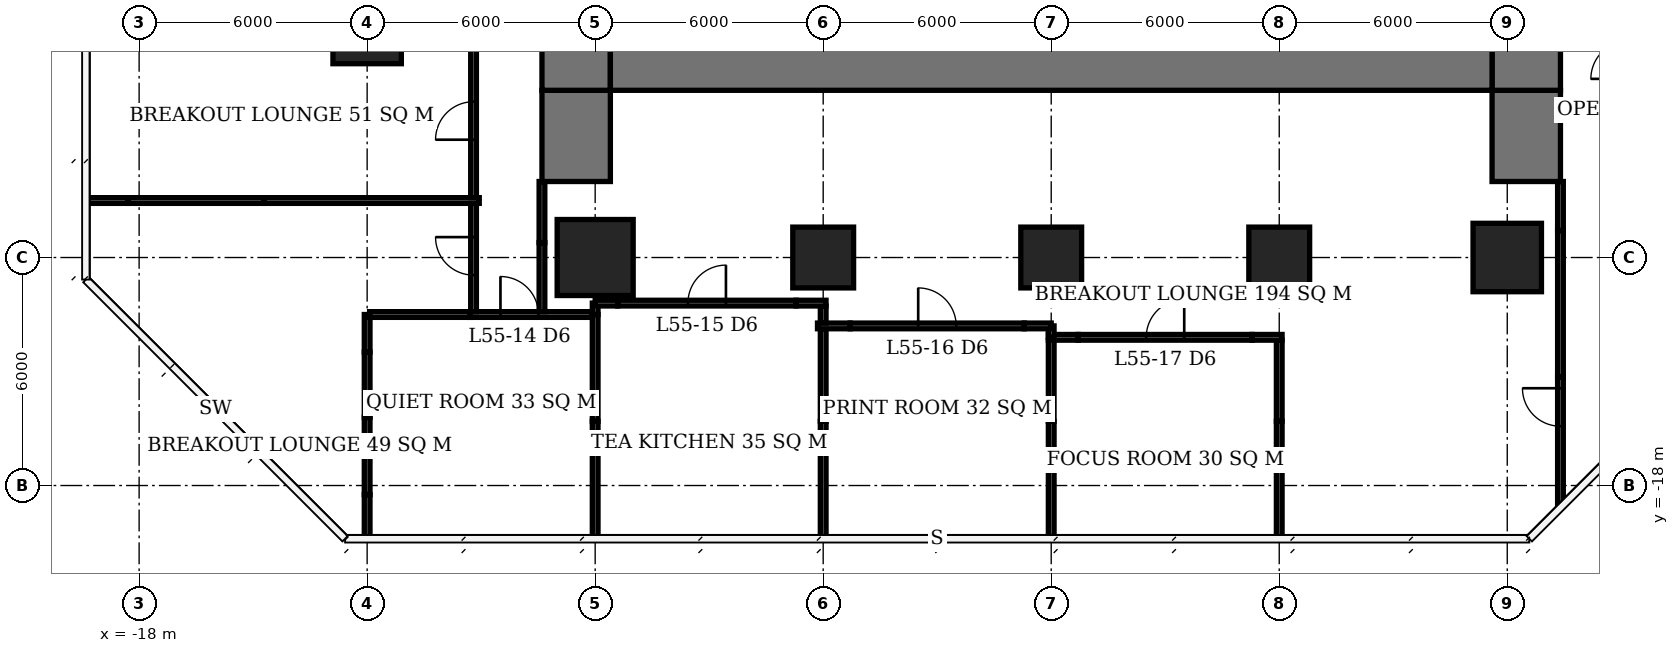
"""IFC4 building model, lengths in metres.
Left out: names, types, materials, properties, quantities, classifications, styles, units other than length and angle.
Written with IfcOpenShell. Run it as: python <this file> out.ifc"""

import sys

from ifc_helpers import new_model, si_unit, direction, frame, frame_2d, origin, origin_2d, place, context, subcontext, project, spatial, rectangle, extrude, element, fill, save


model = new_model("IFC4")
c1 = context("Model", 3, precision=1e-05, world=origin(), true_north=direction((0.0, 1.0)))
c2 = subcontext(c1, "Body", "Model", "MODEL_VIEW")
j1 = project(units=[si_unit("LENGTHUNIT", "METRE"), si_unit("PLANEANGLEUNIT", "RADIAN")], contexts=[c1])
p1 = place(None, origin())
s1 = spatial("IfcSite", under=j1, at=p1, CompositionType="ELEMENT")
p2 = place(p1, origin())
s2 = spatial("IfcBuilding", under=s1, at=p2, CompositionType="ELEMENT")
p3 = place(p2, frame((0.0, 0.0, 224.0)))
s3 = spatial("IfcBuildingStorey", under=s2, at=p3, CompositionType="ELEMENT", Elevation=224.0)
p4 = place(p3, frame((-12.0, -6.0, 0.0), z_axis=(0.0, 0.0, 1.0), x_axis=(1.0, 0.0, 0.0)))
e1 = element("IfcColumn", 1, at=p4, inside=s3, PredefinedType="COLUMN", context=c2, shape_type="SweptSolid", body=[
    extrude(rectangle(XDim=1.8, YDim=1.8, at=origin_2d()), origin(), (0.0, 0.0, 1.0), 3.9),
])
p5 = place(p3, frame((-6.0, -12.0, 0.0), z_axis=(0.0, 0.0, 1.0), x_axis=(1.0, 0.0, 0.0)))
e2 = element("IfcColumn", 2, at=p5, inside=s3, PredefinedType="COLUMN", context=c2, shape_type="SweptSolid", body=[
    extrude(rectangle(XDim=2.0, YDim=2.0, at=origin_2d()), origin(), (0.0, 0.0, 1.0), 3.9),
])
for number, where, z_axis, x_axis in (
    (3, (0.0, -12.0, 0.0), (0.0, 0.0, 1.0), (1.0, 0.0, 0.0)),
    (4, (6.0, -12.0, 0.0), (0.0, 0.0, 1.0), (1.0, 0.0, 0.0)),
    (5, (12.0, -12.0, 0.0), (0.0, 0.0, 1.0), (1.0, 0.0, 0.0)),
):
    element("IfcColumn", number, at=place(p3, frame(where, z_axis=z_axis, x_axis=x_axis)), inside=s3, PredefinedType="COLUMN", context=c2, shape_type="SweptSolid", body=[
        extrude(rectangle(XDim=1.6, YDim=1.6, at=origin_2d()), origin(), (0.0, 0.0, 1.0), 3.9),
    ])
p6 = place(p3, frame((18.0, -12.0, 0.0), z_axis=(0.0, 0.0, 1.0), x_axis=(1.0, 0.0, 0.0)))
e6 = element("IfcColumn", 6, at=p6, inside=s3, PredefinedType="COLUMN", context=c2, shape_type="SweptSolid", body=[
    extrude(rectangle(XDim=1.8, YDim=1.8, at=origin_2d()), origin(), (0.0, 0.0, 1.0), 3.9),
])
p7 = place(p3, frame((-5.6, -6.6, 0.0), z_axis=(0.0, 0.0, 1.0), x_axis=(1.0, 0.0, 0.0)))
e7 = element("IfcWall", 7, at=p7, inside=s3, PredefinedType="SHEAR", context=c2, shape_type="SweptSolid", body=[
    extrude(rectangle(XDim=23.2, YDim=2.0, at=frame_2d((11.6, 0.0))), origin(), (0.0, 0.0, 1.0), 3.9),
])
p8 = place(p3, frame((-6.5, -7.6, 0.0), z_axis=(0.0, 0.0, 1.0), x_axis=(0.0, 1.0, 0.0)))
e8 = element("IfcWall", 8, at=p8, inside=s3, PredefinedType="SHEAR", context=c2, shape_type="SweptSolid", body=[
    extrude(rectangle(XDim=21.2, YDim=1.8, at=frame_2d((10.6, 0.0))), origin(), (0.0, 0.0, 1.0), 3.9),
])
p9 = place(p8, frame((7.8, 0.0, 0.0)))
e9 = element("IfcOpeningElement", 9, at=p9, cuts=e8, PredefinedType="OPENING", context=c2, shape_type="SweptSolid", body=[
    extrude(rectangle(XDim=1.8, YDim=2.4, at=frame_2d((0.9, 1.2))), frame((0.0, 0.91, 0.0), z_axis=(0.0, -1.0, 0.0), x_axis=(1.0, 0.0, 0.0)), (0.0, 0.0, 1.0), 1.82),
])
p10 = place(p3, frame((18.5, -7.6, 0.0), z_axis=(0.0, 0.0, 1.0), x_axis=(0.0, 1.0, 0.0)))
e10 = element("IfcWall", 10, at=p10, inside=s3, PredefinedType="SHEAR", context=c2, shape_type="SweptSolid", body=[
    extrude(rectangle(XDim=21.2, YDim=1.8, at=frame_2d((10.6, 0.0))), origin(), (0.0, 0.0, 1.0), 3.9),
])
p11 = place(p10, frame((9.2, 0.0, 0.0)))
e11 = element("IfcOpeningElement", 11, at=p11, cuts=e10, PredefinedType="OPENING", context=c2, shape_type="SweptSolid", body=[
    extrude(rectangle(XDim=1.8, YDim=2.4, at=frame_2d((0.9, 1.2))), frame((0.0, 0.91, 0.0), z_axis=(0.0, -1.0, 0.0), x_axis=(1.0, 0.0, 0.0)), (0.0, 0.0, 1.0), 1.82),
])
for number, where, z_axis, x_axis in (
    (12, (-6.5, -10.0, 0.0), (0.0, 0.0, 1.0), (0.0, 1.0, 0.0)),
    (13, (18.5, -10.0, 0.0), (0.0, 0.0, 1.0), (0.0, 1.0, 0.0)),
):
    element("IfcWall", number, at=place(p3, frame(where, z_axis=z_axis, x_axis=x_axis)), inside=s3, PredefinedType="SHEAR", context=c2, shape_type="SweptSolid", body=[
        extrude(rectangle(XDim=2.4, YDim=1.8, at=frame_2d((1.2, 0.0))), origin(), (0.0, 0.0, 1.0), 3.9),
    ])
p12 = place(p3, frame((5.925, -14.1, 0.0), z_axis=(0.0, 0.0, 1.0), x_axis=(1.0, 0.0, 0.0)))
e14 = element("IfcWall", 14, at=p12, inside=s3, PredefinedType="PARTITIONING", context=c2, shape_type="SweptSolid", body=[
    extrude(rectangle(XDim=0.785, YDim=0.15, at=frame_2d((0.393, 0.0))), origin(), (0.0, 0.0, 1.0), 2.65),
])
p13 = place(p3, frame((6.71, -14.1, 0.0), z_axis=(0.0, 0.0, 1.0), x_axis=(1.0, 0.0, 0.0)))
e15 = element("IfcWall", 15, at=p13, inside=s3, PredefinedType="PARTITIONING", context=c2, shape_type="SweptSolid", body=[
    extrude(rectangle(XDim=4.58, YDim=0.15, at=frame_2d((2.29, 0.0))), origin(), (0.0, 0.0, 1.0), 3.65),
])
p14 = place(p13, frame((1.79, 0.0, 0.0)))
e16 = element("IfcOpeningElement", 16, at=p14, cuts=e15, PredefinedType="OPENING", context=c2, shape_type="SweptSolid", body=[
    extrude(rectangle(XDim=1.0, YDim=2.1, at=frame_2d((0.5, 1.05))), frame((0.0, 0.085, 0.0), z_axis=(0.0, -1.0, 0.0), x_axis=(1.0, 0.0, 0.0)), (0.0, 0.0, 1.0), 0.17),
])
p15 = place(p3, frame((11.29, -14.1, 0.0), z_axis=(0.0, 0.0, 1.0), x_axis=(1.0, 0.0, 0.0)))
e17 = element("IfcWall", 17, at=p15, inside=s3, PredefinedType="PARTITIONING", context=c2, shape_type="SweptSolid", body=[
    extrude(rectangle(XDim=0.785, YDim=0.15, at=frame_2d((0.393, 0.0))), origin(), (0.0, 0.0, 1.0), 2.65),
])
p16 = place(p3, frame((-0.15, -13.8, 0.0), z_axis=(0.0, 0.0, 1.0), x_axis=(1.0, 0.0, 0.0)))
e18 = element("IfcWall", 18, at=p16, inside=s3, PredefinedType="PARTITIONING", context=c2, shape_type="SweptSolid", body=[
    extrude(rectangle(XDim=0.86, YDim=0.15, at=frame_2d((0.43, 0.0))), origin(), (0.0, 0.0, 1.0), 2.65),
])
p17 = place(p3, frame((0.71, -13.8, 0.0), z_axis=(0.0, 0.0, 1.0), x_axis=(1.0, 0.0, 0.0)))
e19 = element("IfcWall", 19, at=p17, inside=s3, PredefinedType="PARTITIONING", context=c2, shape_type="SweptSolid", body=[
    extrude(rectangle(XDim=4.58, YDim=0.15, at=frame_2d((2.29, 0.0))), origin(), (0.0, 0.0, 1.0), 3.65),
])
p18 = place(p17, frame((1.79, 0.0, 0.0)))
e20 = element("IfcOpeningElement", 20, at=p18, cuts=e19, PredefinedType="OPENING", context=c2, shape_type="SweptSolid", body=[
    extrude(rectangle(XDim=1.0, YDim=2.1, at=frame_2d((0.5, 1.05))), frame((0.0, 0.085, 0.0), z_axis=(0.0, -1.0, 0.0), x_axis=(1.0, 0.0, 0.0)), (0.0, 0.0, 1.0), 0.17),
])
p19 = place(p3, frame((5.29, -13.8, 0.0), z_axis=(0.0, 0.0, 1.0), x_axis=(1.0, 0.0, 0.0)))
e21 = element("IfcWall", 21, at=p19, inside=s3, PredefinedType="PARTITIONING", context=c2, shape_type="SweptSolid", body=[
    extrude(rectangle(XDim=0.71, YDim=0.15, at=frame_2d((0.355, 0.0))), origin(), (0.0, 0.0, 1.0), 2.65),
])
p20 = place(p3, frame((-11.935, -13.5, 0.0), z_axis=(0.0, 0.0, 1.0), x_axis=(1.0, 0.0, 0.0)))
e22 = element("IfcWall", 22, at=p20, inside=s3, PredefinedType="PARTITIONING", context=c2, shape_type="SweptSolid", body=[
    extrude(rectangle(XDim=2.643, YDim=0.15, at=frame_2d((1.322, 0.0))), origin(), (0.0, 0.0, 1.0), 3.65),
])
p21 = place(p3, frame((-9.292, -13.5, 0.0), z_axis=(0.0, 0.0, 1.0), x_axis=(1.0, 0.0, 0.0)))
e23 = element("IfcWall", 23, at=p21, inside=s3, PredefinedType="PARTITIONING", context=c2, shape_type="SweptSolid", body=[
    extrude(rectangle(XDim=3.217, YDim=0.15, at=frame_2d((1.608, 0.0))), origin(), (0.0, 0.0, 1.0), 2.65),
])
p22 = place(p21, frame((0.8, 0.0, 0.0)))
e24 = element("IfcOpeningElement", 24, at=p22, cuts=e23, PredefinedType="OPENING", context=c2, shape_type="SweptSolid", body=[
    extrude(rectangle(XDim=1.0, YDim=2.1, at=frame_2d((0.5, 1.05))), frame((0.0, 0.085, 0.0), z_axis=(0.0, -1.0, 0.0), x_axis=(1.0, 0.0, 0.0)), (0.0, 0.0, 1.0), 0.17),
])
p23 = place(p3, frame((-6.0, -13.2, 0.0), z_axis=(0.0, 0.0, 1.0), x_axis=(1.0, 0.0, 0.0)))
e25 = element("IfcWall", 25, at=p23, inside=s3, PredefinedType="PARTITIONING", context=c2, shape_type="SweptSolid", body=[
    extrude(rectangle(XDim=0.592, YDim=0.15, at=frame_2d((0.296, 0.0))), origin(), (0.0, 0.0, 1.0), 2.65),
])
p24 = place(p3, frame((-5.408, -13.2, 0.0), z_axis=(0.0, 0.0, 1.0), x_axis=(1.0, 0.0, 0.0)))
e26 = element("IfcWall", 26, at=p24, inside=s3, PredefinedType="PARTITIONING", context=c2, shape_type="SweptSolid", body=[
    extrude(rectangle(XDim=4.698, YDim=0.15, at=frame_2d((2.349, 0.0))), origin(), (0.0, 0.0, 1.0), 3.65),
])
p25 = place(p24, frame((1.849, 0.0, 0.0)))
e27 = element("IfcOpeningElement", 27, at=p25, cuts=e26, PredefinedType="OPENING", context=c2, shape_type="SweptSolid", body=[
    extrude(rectangle(XDim=1.0, YDim=2.1, at=frame_2d((0.5, 1.05))), frame((0.0, 0.085, 0.0), z_axis=(0.0, -1.0, 0.0), x_axis=(1.0, 0.0, 0.0)), (0.0, 0.0, 1.0), 0.17),
])
p26 = place(p3, frame((-0.71, -13.2, 0.0), z_axis=(0.0, 0.0, 1.0), x_axis=(1.0, 0.0, 0.0)))
e28 = element("IfcWall", 28, at=p26, inside=s3, PredefinedType="PARTITIONING", context=c2, shape_type="SweptSolid", body=[
    extrude(rectangle(XDim=0.785, YDim=0.15, at=frame_2d((0.393, 0.0))), origin(), (0.0, 0.0, 1.0), 2.65),
])
p27 = place(p3, frame((-12.0, -19.4, 0.0), z_axis=(0.0, 0.0, 1.0), x_axis=(0.0, 1.0, 0.0)))
e29 = element("IfcWall", 29, at=p27, inside=s3, PredefinedType="PARTITIONING", context=c2, shape_type="SweptSolid", body=[
    extrude(rectangle(XDim=1.163, YDim=0.15, at=frame_2d((0.582, 0.0))), origin(), (0.0, 0.0, 1.0), 3.65),
])
p28 = place(p3, frame((-12.0, -18.237, 0.0), z_axis=(0.0, 0.0, 1.0), x_axis=(0.0, 1.0, 0.0)))
e30 = element("IfcWall", 30, at=p28, inside=s3, PredefinedType="PARTITIONING", context=c2, shape_type="SweptSolid", body=[
    extrude(rectangle(XDim=2.029, YDim=0.15, at=frame_2d((1.015, 0.0))), origin(), (0.0, 0.0, 1.0), 2.65),
])
p29 = place(p3, frame((-12.0, -16.208, 0.0), z_axis=(0.0, 0.0, 1.0), x_axis=(0.0, 1.0, 0.0)))
e31 = element("IfcWall", 31, at=p29, inside=s3, PredefinedType="PARTITIONING", context=c2, shape_type="SweptSolid", body=[
    extrude(rectangle(XDim=1.718, YDim=0.15, at=frame_2d((0.859, 0.0))), origin(), (0.0, 0.0, 1.0), 3.65),
])
p30 = place(p3, frame((-12.0, -14.49, 0.0), z_axis=(0.0, 0.0, 1.0), x_axis=(0.0, 1.0, 0.0)))
e32 = element("IfcWall", 32, at=p30, inside=s3, PredefinedType="PARTITIONING", context=c2, shape_type="SweptSolid", body=[
    extrude(rectangle(XDim=0.99, YDim=0.15, at=frame_2d((0.495, 0.0))), origin(), (0.0, 0.0, 1.0), 2.65),
])
p31 = place(p3, frame((-6.0, -19.4, 0.0), z_axis=(0.0, 0.0, 1.0), x_axis=(0.0, 1.0, 0.0)))
e33 = element("IfcWall", 33, at=p31, inside=s3, PredefinedType="PARTITIONING", context=c2, shape_type="SweptSolid", body=[
    extrude(rectangle(XDim=3.09, YDim=0.15, at=frame_2d((1.545, 0.0))), origin(), (0.0, 0.0, 1.0), 3.65),
])
p32 = place(p3, frame((-6.0, -16.31, 0.0), z_axis=(0.0, 0.0, 1.0), x_axis=(0.0, 1.0, 0.0)))
e34 = element("IfcWall", 34, at=p32, inside=s3, PredefinedType="PARTITIONING", context=c2, shape_type="SweptSolid", body=[
    extrude(rectangle(XDim=2.81, YDim=0.15, at=frame_2d((1.405, 0.0))), origin(), (0.0, 0.0, 1.0), 2.65),
])
p33 = place(p3, frame((-6.0, -13.5, 0.0), z_axis=(0.0, 0.0, 1.0), x_axis=(0.0, 1.0, 0.0)))
e35 = element("IfcWall", 35, at=p33, inside=s3, PredefinedType="PARTITIONING", context=c2, shape_type="SweptSolid", body=[
    extrude(rectangle(XDim=0.3, YDim=0.15, at=frame_2d((0.15, 0.0))), origin(), (0.0, 0.0, 1.0), 2.65),
])
p34 = place(p3, frame((0.0, -19.35, 0.0), z_axis=(0.0, 0.0, 1.0), x_axis=(0.0, 1.0, 0.0)))
e36 = element("IfcWall", 36, at=p34, inside=s3, PredefinedType="PARTITIONING", context=c2, shape_type="SweptSolid", body=[
    extrude(rectangle(XDim=3.04, YDim=0.15, at=frame_2d((1.52, 0.0))), origin(), (0.0, 0.0, 1.0), 3.65),
])
p35 = place(p3, frame((0.0, -16.31, 0.0), z_axis=(0.0, 0.0, 1.0), x_axis=(0.0, 1.0, 0.0)))
e37 = element("IfcWall", 37, at=p35, inside=s3, PredefinedType="PARTITIONING", context=c2, shape_type="SweptSolid", body=[
    extrude(rectangle(XDim=2.435, YDim=0.15, at=frame_2d((1.218, 0.0))), origin(), (0.0, 0.0, 1.0), 2.65),
])
p36 = place(p3, frame((0.0, -13.725, 0.0), z_axis=(0.0, 0.0, 1.0), x_axis=(0.0, 1.0, 0.0)))
e38 = element("IfcWall", 38, at=p36, inside=s3, PredefinedType="PARTITIONING", context=c2, shape_type="SweptSolid", body=[
    extrude(rectangle(XDim=0.45, YDim=0.15, at=frame_2d((0.225, 0.0))), origin(), (0.0, 0.0, 1.0), 2.65),
])
p37 = place(p3, frame((6.0, -19.35, 0.0), z_axis=(0.0, 0.0, 1.0), x_axis=(0.0, 1.0, 0.0)))
e39 = element("IfcWall", 39, at=p37, inside=s3, PredefinedType="PARTITIONING", context=c2, shape_type="SweptSolid", body=[
    extrude(rectangle(XDim=3.04, YDim=0.15, at=frame_2d((1.52, 0.0))), origin(), (0.0, 0.0, 1.0), 3.65),
])
p38 = place(p3, frame((6.0, -16.31, 0.0), z_axis=(0.0, 0.0, 1.0), x_axis=(0.0, 1.0, 0.0)))
e40 = element("IfcWall", 40, at=p38, inside=s3, PredefinedType="PARTITIONING", context=c2, shape_type="SweptSolid", body=[
    extrude(rectangle(XDim=2.135, YDim=0.15, at=frame_2d((1.067, 0.0))), origin(), (0.0, 0.0, 1.0), 2.65),
])
p39 = place(p3, frame((6.0, -14.1, 0.0), z_axis=(0.0, 0.0, 1.0), x_axis=(0.0, 1.0, 0.0)))
e41 = element("IfcWall", 41, at=p39, inside=s3, PredefinedType="PARTITIONING", context=c2, shape_type="SweptSolid", body=[
    extrude(rectangle(XDim=0.3, YDim=0.15, at=frame_2d((0.15, 0.0))), origin(), (0.0, 0.0, 1.0), 2.65),
])
p40 = place(p3, frame((12.0, -19.4, 0.0), z_axis=(0.0, 0.0, 1.0), x_axis=(0.0, 1.0, 0.0)))
e42 = element("IfcWall", 42, at=p40, inside=s3, PredefinedType="PARTITIONING", context=c2, shape_type="SweptSolid", body=[
    extrude(rectangle(XDim=3.09, YDim=0.15, at=frame_2d((1.545, 0.0))), origin(), (0.0, 0.0, 1.0), 3.65),
])
p41 = place(p3, frame((12.0, -16.31, 0.0), z_axis=(0.0, 0.0, 1.0), x_axis=(0.0, 1.0, 0.0)))
e43 = element("IfcWall", 43, at=p41, inside=s3, PredefinedType="PARTITIONING", context=c2, shape_type="SweptSolid", body=[
    extrude(rectangle(XDim=2.135, YDim=0.15, at=frame_2d((1.067, 0.0))), origin(), (0.0, 0.0, 1.0), 2.65),
])
p42 = place(p3, frame((-19.4, -10.5, 0.0), z_axis=(0.0, 0.0, 1.0), x_axis=(1.0, 0.0, 0.0)))
e44 = element("IfcWall", 44, at=p42, inside=s3, PredefinedType="PARTITIONING", context=c2, shape_type="SweptSolid", body=[
    extrude(rectangle(XDim=1.108, YDim=0.15, at=frame_2d((0.554, 0.0))), origin(), (0.0, 0.0, 1.0), 3.65),
])
p43 = place(p3, frame((-18.292, -10.5, 0.0), z_axis=(0.0, 0.0, 1.0), x_axis=(1.0, 0.0, 0.0)))
e45 = element("IfcWall", 45, at=p43, inside=s3, PredefinedType="PARTITIONING", context=c2, shape_type="SweptSolid", body=[
    extrude(rectangle(XDim=3.584, YDim=0.15, at=frame_2d((1.792, 0.0))), origin(), (0.0, 0.0, 1.0), 2.65),
])
p44 = place(p3, frame((-14.708, -10.5, 0.0), z_axis=(0.0, 0.0, 1.0), x_axis=(1.0, 0.0, 0.0)))
e46 = element("IfcWall", 46, at=p44, inside=s3, PredefinedType="PARTITIONING", context=c2, shape_type="SweptSolid", body=[
    extrude(rectangle(XDim=5.658, YDim=0.15, at=frame_2d((2.829, 0.0))), origin(), (0.0, 0.0, 1.0), 3.65),
])
p45 = place(p3, frame((-9.2, -13.425, 0.0), z_axis=(0.0, 0.0, 1.0), x_axis=(0.0, 1.0, 0.0)))
e47 = element("IfcWall", 47, at=p45, inside=s3, PredefinedType="PARTITIONING", context=c2, shape_type="SweptSolid", body=[
    extrude(rectangle(XDim=2.85, YDim=0.15, at=frame_2d((1.425, 0.0))), origin(), (0.0, 0.0, 1.0), 3.65),
])
p46 = place(p45, frame((0.962, 0.0, 0.0)))
e48 = element("IfcOpeningElement", 48, at=p46, cuts=e47, PredefinedType="OPENING", context=c2, shape_type="SweptSolid", body=[
    extrude(rectangle(XDim=1.0, YDim=2.1, at=frame_2d((0.5, 1.05))), frame((0.0, 0.085, 0.0), z_axis=(0.0, -1.0, 0.0), x_axis=(1.0, 0.0, 0.0)), (0.0, 0.0, 1.0), 0.17),
])
p47 = place(p3, frame((-9.2, -10.425, 0.0), z_axis=(0.0, 0.0, 1.0), x_axis=(0.0, 1.0, 0.0)))
e49 = element("IfcWall", 49, at=p47, inside=s3, PredefinedType="PARTITIONING", context=c2, shape_type="SweptSolid", body=[
    extrude(rectangle(XDim=5.85, YDim=0.15, at=frame_2d((2.925, 0.0))), origin(), (0.0, 0.0, 1.0), 3.65),
])
p48 = place(p47, frame((1.525, 0.0, 0.0)))
e50 = element("IfcOpeningElement", 50, at=p48, cuts=e49, PredefinedType="OPENING", context=c2, shape_type="SweptSolid", body=[
    extrude(rectangle(XDim=1.0, YDim=2.1, at=frame_2d((0.5, 1.05))), frame((0.0, 0.085, 0.0), z_axis=(0.0, -1.0, 0.0), x_axis=(1.0, 0.0, 0.0)), (0.0, 0.0, 1.0), 0.17),
])
p49 = place(p3, frame((-7.4, -13.425, 0.0), z_axis=(0.0, 0.0, 1.0), x_axis=(0.0, 1.0, 0.0)))
e51 = element("IfcWall", 51, at=p49, inside=s3, PredefinedType="PARTITIONING", context=c2, shape_type="SweptSolid", body=[
    extrude(rectangle(XDim=1.817, YDim=0.15, at=frame_2d((0.909, 0.0))), origin(), (0.0, 0.0, 1.0), 2.65),
])
p50 = place(p3, frame((-7.4, -11.608, 0.0), z_axis=(0.0, 0.0, 1.0), x_axis=(0.0, 1.0, 0.0)))
e52 = element("IfcWall", 52, at=p50, inside=s3, PredefinedType="PARTITIONING", context=c2, shape_type="SweptSolid", body=[
    extrude(rectangle(XDim=1.608, YDim=0.15, at=frame_2d((0.804, 0.0))), origin(), (0.0, 0.0, 1.0), 3.65),
])
p51 = place(p3, frame((19.4, -18.489, 0.0), z_axis=(0.0, 0.0, 1.0), x_axis=(0.0, 1.0, 0.0)))
e53 = element("IfcWall", 53, at=p51, inside=s3, PredefinedType="PARTITIONING", context=c2, shape_type="SweptSolid", body=[
    extrude(rectangle(XDim=3.349, YDim=0.15, at=frame_2d((1.675, 0.0))), origin(), (0.0, 0.0, 1.0), 3.65),
])
p52 = place(p51, frame((2.049, 0.0, 0.0)))
e54 = element("IfcOpeningElement", 54, at=p52, cuts=e53, PredefinedType="OPENING", context=c2, shape_type="SweptSolid", body=[
    extrude(rectangle(XDim=1.0, YDim=2.1, at=frame_2d((0.5, 1.05))), frame((0.0, 0.085, 0.0), z_axis=(0.0, -1.0, 0.0), x_axis=(1.0, 0.0, 0.0)), (0.0, 0.0, 1.0), 0.17),
])
p53 = place(p3, frame((19.4, -15.14, 0.0), z_axis=(0.0, 0.0, 1.0), x_axis=(0.0, 1.0, 0.0)))
e55 = element("IfcWall", 55, at=p53, inside=s3, PredefinedType="PARTITIONING", context=c2, shape_type="SweptSolid", body=[
    extrude(rectangle(XDim=3.85, YDim=0.15, at=frame_2d((1.925, 0.0))), origin(), (0.0, 0.0, 1.0), 2.65),
])
p54 = place(p3, frame((19.4, -11.29, 0.0), z_axis=(0.0, 0.0, 1.0), x_axis=(0.0, 1.0, 0.0)))
e56 = element("IfcWall", 56, at=p54, inside=s3, PredefinedType="PARTITIONING", context=c2, shape_type="SweptSolid", body=[
    extrude(rectangle(XDim=1.29, YDim=0.15, at=frame_2d((0.645, 0.0))), origin(), (0.0, 0.0, 1.0), 3.65),
])
p55 = place(p22, origin())
e57 = element("IfcDoor", 57, at=p55, inside=s3, OperationType="SINGLE_SWING_LEFT", PredefinedType="DOOR", context=c2, shape_type="SweptSolid", body=[
    extrude(rectangle(XDim=1.0, YDim=2.1, at=frame_2d((0.5, 1.05))), frame((0.0, 0.025, 0.0), z_axis=(0.0, -1.0, 0.0), x_axis=(1.0, 0.0, 0.0)), (0.0, 0.0, 1.0), 0.05),
])
fill(e24, e57)
p56 = place(p25, origin())
e58 = element("IfcDoor", 58, at=p56, inside=s3, OperationType="SINGLE_SWING_RIGHT", PredefinedType="DOOR", context=c2, shape_type="SweptSolid", body=[
    extrude(rectangle(XDim=1.0, YDim=2.1, at=frame_2d((0.5, 1.05))), frame((0.0, 0.025, 0.0), z_axis=(0.0, -1.0, 0.0), x_axis=(1.0, 0.0, 0.0)), (0.0, 0.0, 1.0), 0.05),
])
fill(e27, e58)
p57 = place(p18, origin())
e59 = element("IfcDoor", 59, at=p57, inside=s3, OperationType="SINGLE_SWING_LEFT", PredefinedType="DOOR", context=c2, shape_type="SweptSolid", body=[
    extrude(rectangle(XDim=1.0, YDim=2.1, at=frame_2d((0.5, 1.05))), frame((0.0, 0.025, 0.0), z_axis=(0.0, -1.0, 0.0), x_axis=(1.0, 0.0, 0.0)), (0.0, 0.0, 1.0), 0.05),
])
fill(e20, e59)
p58 = place(p14, origin())
e60 = element("IfcDoor", 60, at=p58, inside=s3, OperationType="SINGLE_SWING_RIGHT", PredefinedType="DOOR", context=c2, shape_type="SweptSolid", body=[
    extrude(rectangle(XDim=1.0, YDim=2.1, at=frame_2d((0.5, 1.05))), frame((0.0, 0.025, 0.0), z_axis=(0.0, -1.0, 0.0), x_axis=(1.0, 0.0, 0.0)), (0.0, 0.0, 1.0), 0.05),
])
fill(e16, e60)
p59 = place(p46, origin())
e61 = element("IfcDoor", 61, at=p59, inside=s3, OperationType="SINGLE_SWING_RIGHT", PredefinedType="DOOR", context=c2, shape_type="SweptSolid", body=[
    extrude(rectangle(XDim=1.0, YDim=2.1, at=frame_2d((0.5, 1.05))), frame((0.0, 0.025, 0.0), z_axis=(0.0, -1.0, 0.0), x_axis=(1.0, 0.0, 0.0)), (0.0, 0.0, 1.0), 0.05),
])
fill(e48, e61)
p60 = place(p52, origin())
e62 = element("IfcDoor", 62, at=p60, inside=s3, OperationType="SINGLE_SWING_RIGHT", PredefinedType="DOOR", context=c2, shape_type="SweptSolid", body=[
    extrude(rectangle(XDim=1.0, YDim=2.1, at=frame_2d((0.5, 1.05))), frame((0.0, 0.025, 0.0), z_axis=(0.0, -1.0, 0.0), x_axis=(1.0, 0.0, 0.0)), (0.0, 0.0, 1.0), 0.05),
])
fill(e54, e62)
p61 = place(p48, origin())
e63 = element("IfcDoor", 63, at=p61, inside=s3, OperationType="SINGLE_SWING_LEFT", PredefinedType="DOOR", context=c2, shape_type="SweptSolid", body=[
    extrude(rectangle(XDim=1.0, YDim=2.1, at=frame_2d((0.5, 1.05))), frame((0.0, 0.025, 0.0), z_axis=(0.0, -1.0, 0.0), x_axis=(1.0, 0.0, 0.0)), (0.0, 0.0, 1.0), 0.05),
])
fill(e50, e63)
save(model, sys.argv[1])
